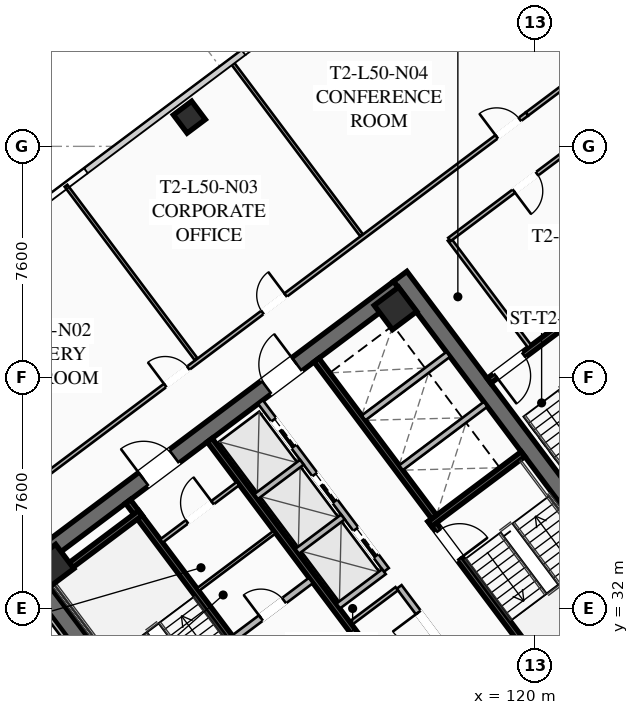
"""IFC4 building model, lengths in metres.
Left out: names, types, materials, properties, quantities, classifications, styles, units other than length and angle.
Written with IfcOpenShell. Run it as: python <this file> out.ifc"""

import sys

from ifc_helpers import new_model, si_unit, direction, frame, frame_2d, origin, origin_2d, place, context, subcontext, project, spatial, rectangle, hollow_rectangle, extrude, element, fill, save


model = new_model("IFC4")
c1 = context("Model", 3, precision=1e-05, world=origin(), true_north=direction((0.0, 1.0)))
c2 = subcontext(c1, "Body", "Model", "MODEL_VIEW")
j1 = project(units=[si_unit("LENGTHUNIT", "METRE"), si_unit("PLANEANGLEUNIT", "RADIAN")], contexts=[c1])
p1 = place(None, origin())
s1 = spatial("IfcSite", under=j1, at=p1, CompositionType="ELEMENT")
p2 = place(p1, origin())
s2 = spatial("IfcBuilding", under=s1, at=p2, CompositionType="ELEMENT")
p3 = place(p2, frame((0.0, 0.0, 185.4)))
s3 = spatial("IfcBuildingStorey", under=s2, at=p3, CompositionType="ELEMENT", Elevation=185.4)
for number, where, z_axis, x_axis in (
    (1, (112.436, 21.077, 0.0), (0.0, 0.0, 1.0), (-0.6, 0.8, 0.0)),
    (2, (115.564, 42.923, 0.0), (0.0, 0.0, 1.0), (0.6, -0.8, 0.0)),
):
    element("IfcWall", number, at=place(p3, frame(where, z_axis=z_axis, x_axis=x_axis)), inside=s3, PredefinedType="SHEAR", context=c2, shape_type="SweptSolid", body=[
        extrude(rectangle(XDim=15.6, YDim=0.55, at=frame_2d((7.8, 0.0))), origin(), (0.0, 0.0, 1.0), 3.55),
    ])
p4 = place(p3, frame((103.461, 33.502, 0.0), z_axis=(0.0, 0.0, 1.0), x_axis=(0.799998054672, 0.600002593761, 0.0)))
e3 = element("IfcWall", 3, at=p4, inside=s3, PredefinedType="SHEAR", context=c2, shape_type="SweptSolid", body=[
    extrude(rectangle(XDim=15.06, YDim=0.55, at=frame_2d((7.53, 0.0))), origin(), (0.0, 0.0, 1.0), 3.55),
])
p5 = place(p4, frame((4.58, 0.0, 0.0)))
e4 = element("IfcOpeningElement", 4, at=p5, cuts=e3, PredefinedType="OPENING", context=c2, shape_type="SweptSolid", body=[
    extrude(rectangle(XDim=1.25, YDim=2.25, at=frame_2d((0.625, 1.125))), frame((0.0, 0.285, 0.0), z_axis=(0.0, -1.0, 0.0), x_axis=(1.0, 0.0, 0.0)), (0.0, 0.0, 1.0), 0.57),
])
p6 = place(p4, frame((9.63, 0.0, 0.0)))
e5 = element("IfcOpeningElement", 5, at=p6, cuts=e3, PredefinedType="OPENING", context=c2, shape_type="SweptSolid", body=[
    extrude(rectangle(XDim=1.25, YDim=2.25, at=frame_2d((0.625, 1.125))), frame((0.0, 0.285, 0.0), z_axis=(0.0, -1.0, 0.0), x_axis=(1.0, 0.0, 0.0)), (0.0, 0.0, 1.0), 0.57),
])
for number, where, z_axis, x_axis in (
    (6, (115.41, 41.87, 0.0), (0.0, 0.0, 1.0), (0.8, 0.6, 0.0)),
    (7, (104.13, 33.41, 0.0), (0.0, 0.0, 1.0), (0.8, 0.6, 0.0)),
):
    element("IfcColumn", number, at=place(p3, frame(where, z_axis=z_axis, x_axis=x_axis)), inside=s3, PredefinedType="COLUMN", context=c2, shape_type="SweptSolid", body=[
        extrude(hollow_rectangle(XDim=1.0, YDim=1.0, WallThickness=0.04, at=origin_2d()), origin(), (0.0, 0.0, 1.0), 3.37),
    ])
p7 = place(p3, frame((108.63, 48.16, 0.0), z_axis=(0.0, 0.0, 1.0), x_axis=(0.799999996291, 0.600000004945, 0.0)))
e8 = element("IfcColumn", 8, at=p7, inside=s3, PredefinedType="COLUMN", context=c2, shape_type="SweptSolid", body=[
    extrude(hollow_rectangle(XDim=0.75, YDim=0.75, WallThickness=0.032, at=origin_2d()), origin(), (0.0, 0.0, 1.0), 3.37),
])
p8 = place(p3, frame((111.44, 29.08, 0.0), z_axis=(0.0, 0.0, 1.0), x_axis=(-0.59999029481, 0.8000072788, 0.0)))
e9 = element("IfcWall", 9, at=p8, inside=s3, PredefinedType="SHEAR", context=c2, shape_type="SweptSolid", body=[
    extrude(rectangle(XDim=8.05, YDim=0.2, at=frame_2d((4.025, 0.0))), origin(), (0.0, 0.0, 1.0), 3.37),
])
p9 = place(p8, frame((0.45, 0.0, 0.0)))
e10 = element("IfcOpeningElement", 10, at=p9, cuts=e9, PredefinedType="OPENING", context=c2, shape_type="SweptSolid", body=[
    extrude(rectangle(XDim=1.15, YDim=2.2, at=frame_2d((0.575, 1.1))), frame((0.0, 0.11, 0.0), z_axis=(0.0, -1.0, 0.0), x_axis=(1.0, 0.0, 0.0)), (0.0, 0.0, 1.0), 0.22),
])
p10 = place(p3, frame((103.956, 32.842, 0.0), z_axis=(0.0, 0.0, 1.0), x_axis=(0.800015298837, 0.599979601008, 0.0)))
e11 = element("IfcWall", 11, at=p10, inside=s3, PredefinedType="SHEAR", context=c2, shape_type="SweptSolid", body=[
    extrude(rectangle(XDim=3.83, YDim=0.2, at=frame_2d((1.915, 0.0))), origin(), (0.0, 0.0, 1.0), 3.37),
])
p11 = place(p3, frame((116.56, 34.92, 0.0), z_axis=(0.0, 0.0, 1.0), x_axis=(0.59999029481, -0.8000072788, 0.0)))
e12 = element("IfcWall", 12, at=p11, inside=s3, PredefinedType="SHEAR", context=c2, shape_type="SweptSolid", body=[
    extrude(rectangle(XDim=8.05, YDim=0.2, at=frame_2d((4.025, 0.0))), origin(), (0.0, 0.0, 1.0), 3.37),
])
p12 = place(p11, frame((0.45, 0.0, 0.0)))
e13 = element("IfcOpeningElement", 13, at=p12, cuts=e12, PredefinedType="OPENING", context=c2, shape_type="SweptSolid", body=[
    extrude(rectangle(XDim=1.15, YDim=2.2, at=frame_2d((0.575, 1.1))), frame((0.0, 0.11, 0.0), z_axis=(0.0, -1.0, 0.0), x_axis=(1.0, 0.0, 0.0)), (0.0, 0.0, 1.0), 0.22),
])
p13 = place(p3, frame((116.54, 34.78, 0.0), z_axis=(0.0, 0.0, 1.0), x_axis=(0.800015298837, 0.599979601008, 0.0)))
e14 = element("IfcWall", 14, at=p13, inside=s3, PredefinedType="SHEAR", context=c2, shape_type="SweptSolid", body=[
    extrude(rectangle(XDim=3.83, YDim=0.2, at=frame_2d((1.915, 0.0))), origin(), (0.0, 0.0, 1.0), 3.37),
])
p14 = place(p3, frame((117.998, 25.936, 0.0), z_axis=(0.0, 0.0, 1.0), x_axis=(-0.600002693989, 0.799997979501, 0.0)))
e15 = element("IfcWall", 15, at=p14, inside=s3, PredefinedType="SHEAR", context=c2, shape_type="SweptSolid", body=[
    extrude(rectangle(XDim=14.5, YDim=0.2, at=frame_2d((7.25, 0.0))), origin(), (0.0, 0.0, 1.0), 3.37),
])
p15 = place(p3, frame((110.104, 31.028, 0.0), z_axis=(0.0, 0.0, 1.0), x_axis=(0.800018601094, 0.59997519774, 0.0)))
e16 = element("IfcWall", 16, at=p15, inside=s3, PredefinedType="SOLIDWALL", context=c2, shape_type="SweptSolid", body=[
    extrude(rectangle(XDim=3.15, YDim=0.22, at=frame_2d((1.575, 0.0))), origin(), (0.0, 0.0, 1.0), 2.723),
])
p16 = place(p15, frame((1.1, 0.0, 0.0)))
e17 = element("IfcOpeningElement", 17, at=p16, cuts=e16, PredefinedType="OPENING", context=c2, shape_type="SweptSolid", body=[
    extrude(rectangle(XDim=0.95, YDim=2.05, at=frame_2d((0.475, 1.025))), frame((0.0, 0.12, 0.0), z_axis=(0.0, -1.0, 0.0), x_axis=(1.0, 0.0, 0.0)), (0.0, 0.0, 1.0), 0.24),
])
p17 = place(p3, frame((112.81, 40.17, 0.0), z_axis=(0.0, 0.0, 1.0), x_axis=(0.599993943644, -0.800004542231, 0.0)))
e18 = element("IfcWall", 18, at=p17, inside=s3, PredefinedType="SHEAR", context=c2, shape_type="SweptSolid", body=[
    extrude(rectangle(XDim=6.45, YDim=0.2, at=frame_2d((3.225, 0.0))), origin(), (0.0, 0.0, 1.0), 3.37),
])
for number, where, z_axis, x_axis in (
    (19, (115.59, 36.63, 0.0), (0.0, 0.0, 1.0), (0.8, 0.6, 0.0)),
    (20, (114.36, 38.27, 0.0), (0.0, 0.0, 1.0), (0.8, 0.6, 0.0)),
):
    element("IfcWall", number, at=place(p3, frame(where, z_axis=z_axis, x_axis=x_axis)), inside=s3, PredefinedType="SOLIDWALL", context=c2, shape_type="SweptSolid", body=[
        extrude(rectangle(XDim=3.48, YDim=0.2, at=frame_2d((1.74, 0.0))), origin(), (0.0, 0.0, 1.0), 3.37),
    ])
p18 = place(p3, frame((107.71, 34.22, 0.0), z_axis=(0.0, 0.0, 1.0), x_axis=(0.799981399002, 0.60002480053, 0.0)))
e21 = element("IfcWall", 21, at=p18, inside=s3, PredefinedType="PARTITIONING", context=c2, shape_type="SweptSolid", body=[
    extrude(rectangle(XDim=3.15, YDim=0.135, at=frame_2d((1.575, 0.0))), origin(), (0.0, 0.0, 1.0), 2.723),
])
p19 = place(p18, frame((1.05, 0.0, 0.0)))
e22 = element("IfcOpeningElement", 22, at=p19, cuts=e21, PredefinedType="OPENING", context=c2, shape_type="SweptSolid", body=[
    extrude(rectangle(XDim=1.05, YDim=2.2, at=frame_2d((0.525, 1.1))), frame((0.0, 0.077, 0.0), z_axis=(0.0, -1.0, 0.0), x_axis=(1.0, 0.0, 0.0)), (0.0, 0.0, 1.0), 0.155),
])
p20 = place(p3, frame((108.91, 32.62, 0.0), z_axis=(0.0, 0.0, 1.0), x_axis=(0.800018601094, 0.59997519774, 0.0)))
e23 = element("IfcWall", 23, at=p20, inside=s3, PredefinedType="PARTITIONING", context=c2, shape_type="SweptSolid", body=[
    extrude(rectangle(XDim=3.15, YDim=0.11, at=frame_2d((1.575, 0.0))), origin(), (0.0, 0.0, 1.0), 2.723),
])
p21 = place(p3, frame((119.67, 27.19, 0.0), z_axis=(0.0, 0.0, 1.0), x_axis=(-0.599988677396, 0.800008491828, 0.0)))
e24 = element("IfcWall", 24, at=p21, inside=s3, PredefinedType="SOLIDWALL", context=c2, shape_type="SweptSolid", body=[
    extrude(rectangle(XDim=6.9, YDim=0.2, at=frame_2d((3.45, 0.0))), origin(), (0.0, 0.0, 1.0), 2.723),
])
p22 = place(p21, frame((0.85, 0.0, 0.0)))
e25 = element("IfcOpeningElement", 25, at=p22, cuts=e24, PredefinedType="OPENING", context=c2, shape_type="SweptSolid", body=[
    extrude(rectangle(XDim=0.95, YDim=2.05, at=frame_2d((0.475, 1.025))), frame((0.0, 0.11, 0.0), z_axis=(0.0, -1.0, 0.0), x_axis=(1.0, 0.0, 0.0)), (0.0, 0.0, 1.0), 0.22),
])
p23 = place(p21, frame((4.8, 0.0, 0.0)))
e26 = element("IfcOpeningElement", 26, at=p23, cuts=e24, PredefinedType="OPENING", context=c2, shape_type="SweptSolid", body=[
    extrude(rectangle(XDim=1.05, YDim=2.2, at=frame_2d((0.525, 1.1))), frame((0.0, 0.11, 0.0), z_axis=(0.0, -1.0, 0.0), x_axis=(1.0, 0.0, 0.0)), (0.0, 0.0, 1.0), 0.22),
])
p24 = place(p3, frame((113.946, 31.522, 0.0), z_axis=(0.0, 0.0, 1.0), x_axis=(0.8, 0.6, 0.0)))
e27 = element("IfcWall", 27, at=p24, inside=s3, PredefinedType="PARTITIONING", context=c2, shape_type="SweptSolid", body=[
    extrude(rectangle(XDim=1.88, YDim=0.135, at=frame_2d((0.94, 0.0))), origin(), (0.0, 0.0, 1.0), 2.723),
])
p25 = place(p3, frame((115.11, 33.27, 0.0), z_axis=(0.0, 0.0, 1.0), x_axis=(-0.600011322243, 0.799991508192, 0.0)))
e28 = element("IfcWall", 28, at=p25, inside=s3, PredefinedType="SOLIDWALL", context=c2, shape_type="SweptSolid", body=[
    extrude(rectangle(XDim=6.9, YDim=0.2, at=frame_2d((3.45, 0.0))), origin(), (0.0, 0.0, 1.0), 3.37),
])
p26 = place(p25, frame((0.575, 0.0, 0.0)))
e29 = element("IfcOpeningElement", 29, at=p26, cuts=e28, PredefinedType="OPENING", context=c2, shape_type="SweptSolid", body=[
    extrude(rectangle(XDim=1.1, YDim=2.2, at=frame_2d((0.55, 1.1))), frame((0.0, 0.11, 0.0), z_axis=(0.0, -1.0, 0.0), x_axis=(1.0, 0.0, 0.0)), (0.0, 0.0, 1.0), 0.22),
])
p27 = place(p25, frame((2.825, 0.0, 0.0)))
e30 = element("IfcOpeningElement", 30, at=p27, cuts=e28, PredefinedType="OPENING", context=c2, shape_type="SweptSolid", body=[
    extrude(rectangle(XDim=1.1, YDim=2.2, at=frame_2d((0.55, 1.1))), frame((0.0, 0.11, 0.0), z_axis=(0.0, -1.0, 0.0), x_axis=(1.0, 0.0, 0.0)), (0.0, 0.0, 1.0), 0.22),
])
p28 = place(p25, frame((5.075, 0.0, 0.0)))
e31 = element("IfcOpeningElement", 31, at=p28, cuts=e28, PredefinedType="OPENING", context=c2, shape_type="SweptSolid", body=[
    extrude(rectangle(XDim=1.1, YDim=2.2, at=frame_2d((0.55, 1.1))), frame((0.0, 0.11, 0.0), z_axis=(0.0, -1.0, 0.0), x_axis=(1.0, 0.0, 0.0)), (0.0, 0.0, 1.0), 0.22),
])
p29 = place(p3, frame((113.526, 32.082, 0.0), z_axis=(0.0, 0.0, 1.0), x_axis=(0.800046745961, 0.599937666993, 0.0)))
e32 = element("IfcWall", 32, at=p29, inside=s3, PredefinedType="SOLIDWALL", context=c2, shape_type="SweptSolid", body=[
    extrude(rectangle(XDim=1.88, YDim=0.2, at=frame_2d((0.94, 0.0))), origin(), (0.0, 0.0, 1.0), 3.37),
])
p30 = place(p3, frame((112.176, 33.882, 0.0), z_axis=(0.0, 0.0, 1.0), x_axis=(0.8, 0.6, 0.0)))
e33 = element("IfcWall", 33, at=p30, inside=s3, PredefinedType="SOLIDWALL", context=c2, shape_type="SweptSolid", body=[
    extrude(rectangle(XDim=1.88, YDim=0.2, at=frame_2d((0.94, 0.0))), origin(), (0.0, 0.0, 1.0), 3.37),
])
p31 = place(p3, frame((110.826, 35.682, 0.0), z_axis=(0.0, 0.0, 1.0), x_axis=(0.799984418148, 0.600020775241, 0.0)))
e34 = element("IfcWall", 34, at=p31, inside=s3, PredefinedType="SOLIDWALL", context=c2, shape_type="SweptSolid", body=[
    extrude(rectangle(XDim=1.88, YDim=0.2, at=frame_2d((0.94, 0.0))), origin(), (0.0, 0.0, 1.0), 3.37),
])
p32 = place(p3, frame((121.204, 41.528, 0.0), z_axis=(0.0, 0.0, 1.0), x_axis=(-0.800017232136, -0.599977023131, 0.0)))
e35 = element("IfcWall", 35, at=p32, inside=s3, PredefinedType="SHEAR", context=c2, shape_type="SweptSolid", body=[
    extrude(rectangle(XDim=3.4, YDim=0.2, at=frame_2d((1.7, 0.0))), origin(), (0.0, 0.0, 1.0), 3.37),
])
p33 = place(p32, frame((1.975, 0.0, 0.0)))
e36 = element("IfcOpeningElement", 36, at=p33, cuts=e35, PredefinedType="OPENING", context=c2, shape_type="SweptSolid", body=[
    extrude(rectangle(XDim=1.15, YDim=2.2, at=frame_2d((0.575, 1.1))), frame((0.0, 0.11, 0.0), z_axis=(0.0, -1.0, 0.0), x_axis=(1.0, 0.0, 0.0)), (0.0, 0.0, 1.0), 0.22),
])
p34 = place(p3, frame((119.824, 40.618, 0.0), z_axis=(0.0, 0.0, 1.0), x_axis=(-0.599982243973, 0.800013316712, 0.0)))
e37 = element("IfcWall", 37, at=p34, inside=s3, PredefinedType="PARTITIONING", context=c2, shape_type="SweptSolid", body=[
    extrude(rectangle(XDim=4.4, YDim=0.135, at=frame_2d((2.2, 0.0))), origin(), (0.0, 0.0, 1.0), 2.723),
])
p35 = place(p3, frame((96.778, 31.046, 0.0), z_axis=(0.0, 0.0, 1.0), x_axis=(0.799995916807, 0.600005444218, 0.0)))
e38 = element("IfcWall", 38, at=p35, inside=s3, PredefinedType="PARTITIONING", context=c2, shape_type="SweptSolid", body=[
    extrude(rectangle(XDim=28.7, YDim=0.135, at=frame_2d((14.35, 0.0))), origin(), (0.0, 0.0, 1.0), 2.723),
])
p36 = place(p35, frame((0.3, 0.0, 0.0)))
e39 = element("IfcOpeningElement", 39, at=p36, cuts=e38, PredefinedType="OPENING", context=c2, shape_type="SweptSolid", body=[
    extrude(rectangle(XDim=0.95, YDim=2.05, at=frame_2d((0.475, 1.025))), frame((0.0, 0.077, 0.0), z_axis=(0.0, -1.0, 0.0), x_axis=(1.0, 0.0, 0.0)), (0.0, 0.0, 1.0), 0.155),
])
p37 = place(p35, frame((13.82, 0.0, 0.0)))
e40 = element("IfcOpeningElement", 40, at=p37, cuts=e38, PredefinedType="OPENING", context=c2, shape_type="SweptSolid", body=[
    extrude(rectangle(XDim=0.95, YDim=2.05, at=frame_2d((0.475, 1.025))), frame((0.0, 0.077, 0.0), z_axis=(0.0, -1.0, 0.0), x_axis=(1.0, 0.0, 0.0)), (0.0, 0.0, 1.0), 0.155),
])
p38 = place(p35, frame((17.821, 0.0, 0.0)))
e41 = element("IfcOpeningElement", 41, at=p38, cuts=e38, PredefinedType="OPENING", context=c2, shape_type="SweptSolid", body=[
    extrude(rectangle(XDim=0.95, YDim=2.05, at=frame_2d((0.475, 1.025))), frame((0.0, 0.077, 0.0), z_axis=(0.0, -1.0, 0.0), x_axis=(1.0, 0.0, 0.0)), (0.0, 0.0, 1.0), 0.155),
])
p39 = place(p35, frame((27.45, 0.0, 0.0)))
e42 = element("IfcOpeningElement", 42, at=p39, cuts=e38, PredefinedType="OPENING", context=c2, shape_type="SweptSolid", body=[
    extrude(rectangle(XDim=0.95, YDim=2.05, at=frame_2d((0.475, 1.025))), frame((0.0, 0.077, 0.0), z_axis=(0.0, -1.0, 0.0), x_axis=(1.0, 0.0, 0.0)), (0.0, 0.0, 1.0), 0.155),
])
p40 = place(p3, frame((119.738, 48.266, 0.0), z_axis=(0.0, 0.0, 1.0), x_axis=(0.799975885537, 0.600032151272, 0.0)))
e43 = element("IfcWall", 43, at=p40, inside=s3, PredefinedType="PARTITIONING", context=c2, shape_type="SweptSolid", body=[
    extrude(rectangle(XDim=2.43, YDim=0.135, at=frame_2d((1.215, 0.0))), origin(), (0.0, 0.0, 1.0), 2.723),
])
p41 = place(p3, frame((108.85, 40.2, 0.0), z_axis=(0.0, 0.0, 1.0), x_axis=(-0.6, 0.8, 0.0)))
e44 = element("IfcWall", 44, at=p41, inside=s3, PredefinedType="PARTITIONING", context=c2, shape_type="SweptSolid", body=[
    extrude(rectangle(XDim=7.13, YDim=0.11, at=frame_2d((3.565, 0.0))), origin(), (0.0, 0.0, 1.0), 2.723),
])
p42 = place(p3, frame((114.29, 44.28, 0.0), z_axis=(0.0, 0.0, 1.0), x_axis=(-0.600016435865, 0.799987672837, 0.0)))
e45 = element("IfcWall", 45, at=p42, inside=s3, PredefinedType="PARTITIONING", context=c2, shape_type="SweptSolid", body=[
    extrude(rectangle(XDim=7.13, YDim=0.11, at=frame_2d((3.565, 0.0))), origin(), (0.0, 0.0, 1.0), 2.723),
])
p43 = place(p3, frame((131.6, 32.45, 0.0), z_axis=(0.0, 0.0, 1.0), x_axis=(-0.800003062365, -0.599995916825, 0.0)))
e46 = element("IfcWall", 46, at=p43, inside=s3, PredefinedType="PARTITIONING", context=c2, shape_type="SweptSolid", body=[
    extrude(rectangle(XDim=28.7, YDim=0.135, at=frame_2d((14.35, 0.0))), origin(), (0.0, 0.0, 1.0), 2.723),
])
p44 = place(p43, frame((27.37, 0.0, 0.0)))
e47 = element("IfcOpeningElement", 47, at=p44, cuts=e46, PredefinedType="OPENING", context=c2, shape_type="SweptSolid", body=[
    extrude(rectangle(XDim=0.95, YDim=2.05, at=frame_2d((0.475, 1.025))), frame((0.0, 0.077, 0.0), z_axis=(0.0, -1.0, 0.0), x_axis=(1.0, 0.0, 0.0)), (0.0, 0.0, 1.0), 0.155),
])
p45 = place(p43, frame((13.59, 0.0, 0.0)))
e48 = element("IfcOpeningElement", 48, at=p45, cuts=e46, PredefinedType="OPENING", context=c2, shape_type="SweptSolid", body=[
    extrude(rectangle(XDim=0.95, YDim=2.05, at=frame_2d((0.475, 1.025))), frame((0.0, 0.077, 0.0), z_axis=(0.0, -1.0, 0.0), x_axis=(1.0, 0.0, 0.0)), (0.0, 0.0, 1.0), 0.155),
])
p46 = place(p43, frame((9.796, 0.0, 0.0)))
e49 = element("IfcOpeningElement", 49, at=p46, cuts=e46, PredefinedType="OPENING", context=c2, shape_type="SweptSolid", body=[
    extrude(rectangle(XDim=0.95, YDim=2.05, at=frame_2d((0.475, 1.025))), frame((0.0, 0.077, 0.0), z_axis=(0.0, -1.0, 0.0), x_axis=(1.0, 0.0, 0.0)), (0.0, 0.0, 1.0), 0.155),
])
p47 = place(p43, frame((0.38, 0.0, 0.0)))
e50 = element("IfcOpeningElement", 50, at=p47, cuts=e46, PredefinedType="OPENING", context=c2, shape_type="SweptSolid", body=[
    extrude(rectangle(XDim=0.95, YDim=2.05, at=frame_2d((0.475, 1.025))), frame((0.0, 0.077, 0.0), z_axis=(0.0, -1.0, 0.0), x_axis=(1.0, 0.0, 0.0)), (0.0, 0.0, 1.0), 0.155),
])
p48 = place(p3, frame((122.624, 48.218, 0.0), z_axis=(0.0, 0.0, 1.0), x_axis=(-0.79999138319, -0.600011488909, 0.0)))
e51 = element("IfcWall", 51, at=p48, inside=s3, PredefinedType="PARTITIONING", context=c2, shape_type="SweptSolid", body=[
    extrude(rectangle(XDim=6.8, YDim=0.135, at=frame_2d((3.4, 0.0))), origin(), (0.0, 0.0, 1.0), 2.723),
])
p49 = place(p48, frame((3.2, 0.0, 0.0)))
e52 = element("IfcOpeningElement", 52, at=p49, cuts=e51, PredefinedType="OPENING", context=c2, shape_type="SweptSolid", body=[
    extrude(rectangle(XDim=0.95, YDim=2.05, at=frame_2d((0.475, 1.025))), frame((0.0, 0.077, 0.0), z_axis=(0.0, -1.0, 0.0), x_axis=(1.0, 0.0, 0.0)), (0.0, 0.0, 1.0), 0.155),
])
p50 = place(p3, frame((112.104, 20.928, 0.0), z_axis=(0.0, 0.0, 1.0), x_axis=(-0.599994940075, 0.800003794918, 0.0)))
e53 = element("IfcWall", 53, at=p50, inside=s3, PredefinedType="PARTITIONING", context=c2, shape_type="SweptSolid", body=[
    extrude(rectangle(XDim=15.44, YDim=0.135, at=frame_2d((7.72, 0.0))), origin(), (0.0, 0.0, 1.0), 2.723),
])
p51 = place(p5, origin())
e54 = element("IfcDoor", 54, at=p51, inside=s3, OperationType="SINGLE_SWING_LEFT", PredefinedType="DOOR", context=c2, shape_type="SweptSolid", body=[
    extrude(rectangle(XDim=1.25, YDim=2.25, at=frame_2d((0.625, 1.125))), frame((0.0, 0.025, 0.0), z_axis=(0.0, -1.0, 0.0), x_axis=(1.0, 0.0, 0.0)), (0.0, 0.0, 1.0), 0.05),
])
fill(e4, e54)
p52 = place(p6, origin())
e55 = element("IfcDoor", 55, at=p52, inside=s3, OperationType="SINGLE_SWING_RIGHT", PredefinedType="DOOR", context=c2, shape_type="SweptSolid", body=[
    extrude(rectangle(XDim=1.25, YDim=2.25, at=frame_2d((0.625, 1.125))), frame((0.0, 0.025, 0.0), z_axis=(0.0, -1.0, 0.0), x_axis=(1.0, 0.0, 0.0)), (0.0, 0.0, 1.0), 0.05),
])
fill(e5, e55)
p53 = place(p12, origin())
e56 = element("IfcDoor", 56, at=p53, inside=s3, OperationType="SINGLE_SWING_RIGHT", PredefinedType="DOOR", context=c2, shape_type="SweptSolid", body=[
    extrude(rectangle(XDim=1.15, YDim=2.2, at=frame_2d((0.575, 1.1))), frame((0.0, 0.025, 0.0), z_axis=(0.0, -1.0, 0.0), x_axis=(1.0, 0.0, 0.0)), (0.0, 0.0, 1.0), 0.05),
])
fill(e13, e56)
p54 = place(p19, origin())
e57 = element("IfcDoor", 57, at=p54, inside=s3, OperationType="SINGLE_SWING_RIGHT", PredefinedType="DOOR", context=c2, shape_type="SweptSolid", body=[
    extrude(rectangle(XDim=1.05, YDim=2.2, at=frame_2d((0.525, 1.1))), frame((0.0, 0.025, 0.0), z_axis=(0.0, -1.0, 0.0), x_axis=(1.0, 0.0, 0.0)), (0.0, 0.0, 1.0), 0.05),
])
fill(e22, e57)
p55 = place(p16, origin())
e58 = element("IfcDoor", 58, at=p55, inside=s3, OperationType="SINGLE_SWING_LEFT", PredefinedType="DOOR", context=c2, shape_type="SweptSolid", body=[
    extrude(rectangle(XDim=0.95, YDim=2.05, at=frame_2d((0.475, 1.025))), frame((0.0, 0.025, 0.0), z_axis=(0.0, -1.0, 0.0), x_axis=(1.0, 0.0, 0.0)), (0.0, 0.0, 1.0), 0.05),
])
fill(e17, e58)
p56 = place(p23, origin())
e59 = element("IfcDoor", 59, at=p56, inside=s3, OperationType="SINGLE_SWING_RIGHT", PredefinedType="DOOR", context=c2, shape_type="SweptSolid", body=[
    extrude(rectangle(XDim=1.05, YDim=2.2, at=frame_2d((0.525, 1.1))), frame((0.0, 0.025, 0.0), z_axis=(0.0, -1.0, 0.0), x_axis=(1.0, 0.0, 0.0)), (0.0, 0.0, 1.0), 0.05),
])
fill(e26, e59)
p57 = place(p33, origin())
e60 = element("IfcDoor", 60, at=p57, inside=s3, OperationType="SINGLE_SWING_RIGHT", PredefinedType="DOOR", context=c2, shape_type="SweptSolid", body=[
    extrude(rectangle(XDim=1.15, YDim=2.2, at=frame_2d((0.575, 1.1))), frame((0.0, 0.025, 0.0), z_axis=(0.0, -1.0, 0.0), x_axis=(1.0, 0.0, 0.0)), (0.0, 0.0, 1.0), 0.05),
])
fill(e36, e60)
p58 = place(p37, origin())
e61 = element("IfcDoor", 61, at=p58, inside=s3, OperationType="SINGLE_SWING_LEFT", PredefinedType="DOOR", context=c2, shape_type="SweptSolid", body=[
    extrude(rectangle(XDim=0.95, YDim=2.05, at=frame_2d((0.475, 1.025))), frame((0.0, 0.025, 0.0), z_axis=(0.0, -1.0, 0.0), x_axis=(1.0, 0.0, 0.0)), (0.0, 0.0, 1.0), 0.05),
])
fill(e40, e61)
p59 = place(p38, origin())
e62 = element("IfcDoor", 62, at=p59, inside=s3, OperationType="SINGLE_SWING_RIGHT", PredefinedType="DOOR", context=c2, shape_type="SweptSolid", body=[
    extrude(rectangle(XDim=0.95, YDim=2.05, at=frame_2d((0.475, 1.025))), frame((0.0, 0.025, 0.0), z_axis=(0.0, -1.0, 0.0), x_axis=(1.0, 0.0, 0.0)), (0.0, 0.0, 1.0), 0.05),
])
fill(e41, e62)
p60 = place(p39, origin())
e63 = element("IfcDoor", 63, at=p60, inside=s3, OperationType="SINGLE_SWING_LEFT", PredefinedType="DOOR", context=c2, shape_type="SweptSolid", body=[
    extrude(rectangle(XDim=0.95, YDim=2.05, at=frame_2d((0.475, 1.025))), frame((0.0, 0.025, 0.0), z_axis=(0.0, -1.0, 0.0), x_axis=(1.0, 0.0, 0.0)), (0.0, 0.0, 1.0), 0.05),
])
fill(e42, e63)
p61 = place(p49, origin())
e64 = element("IfcDoor", 64, at=p61, inside=s3, OperationType="SINGLE_SWING_RIGHT", PredefinedType="DOOR", context=c2, shape_type="SweptSolid", body=[
    extrude(rectangle(XDim=0.95, YDim=2.05, at=frame_2d((0.475, 1.025))), frame((0.0, 0.025, 0.0), z_axis=(0.0, -1.0, 0.0), x_axis=(1.0, 0.0, 0.0)), (0.0, 0.0, 1.0), 0.05),
])
fill(e52, e64)
p62 = place(p26, origin())
e65 = element("IfcDoor", 65, at=p62, inside=s3, OperationType="SLIDING_TO_LEFT", PredefinedType="DOOR", context=c2, shape_type="SweptSolid", body=[
    extrude(rectangle(XDim=1.1, YDim=2.2, at=frame_2d((0.55, 1.1))), frame((0.0, 0.025, 0.0), z_axis=(0.0, -1.0, 0.0), x_axis=(1.0, 0.0, 0.0)), (0.0, 0.0, 1.0), 0.05),
])
fill(e29, e65)
p63 = place(p27, origin())
e66 = element("IfcDoor", 66, at=p63, inside=s3, OperationType="SLIDING_TO_LEFT", PredefinedType="DOOR", context=c2, shape_type="SweptSolid", body=[
    extrude(rectangle(XDim=1.1, YDim=2.2, at=frame_2d((0.55, 1.1))), frame((0.0, 0.025, 0.0), z_axis=(0.0, -1.0, 0.0), x_axis=(1.0, 0.0, 0.0)), (0.0, 0.0, 1.0), 0.05),
])
fill(e30, e66)
p64 = place(p28, origin())
e67 = element("IfcDoor", 67, at=p64, inside=s3, OperationType="SLIDING_TO_LEFT", PredefinedType="DOOR", context=c2, shape_type="SweptSolid", body=[
    extrude(rectangle(XDim=1.1, YDim=2.2, at=frame_2d((0.55, 1.1))), frame((0.0, 0.025, 0.0), z_axis=(0.0, -1.0, 0.0), x_axis=(1.0, 0.0, 0.0)), (0.0, 0.0, 1.0), 0.05),
])
fill(e31, e67)
save(model, sys.argv[1])
